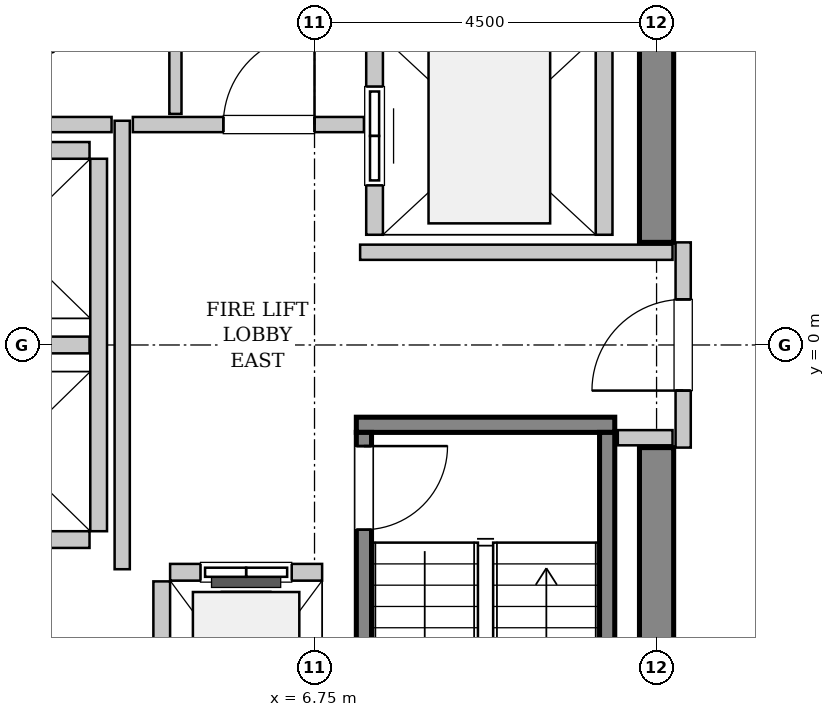
"""IFC4 building model, lengths in metres.
Left out: names, types, materials, properties, quantities, classifications, styles, units other than length and angle.
Written with IfcOpenShell. Run it as: python <this file> out.ifc"""

import sys

from ifc_helpers import new_model, si_unit, direction, frame, frame_2d, origin, place, context, subcontext, project, spatial, rectangle, extrude, source, transform, mapped, element, fill, save


model = new_model("IFC4")
c1 = context("Model", 3, precision=1e-05, world=origin(), true_north=direction((0.0, 1.0)))
c2 = subcontext(c1, "Body", "Model", "MODEL_VIEW")
j1 = project(units=[si_unit("LENGTHUNIT", "METRE"), si_unit("PLANEANGLEUNIT", "RADIAN")], contexts=[c1])
p1 = place(None, origin())
s1 = spatial("IfcSite", under=j1, at=p1, CompositionType="ELEMENT")
p2 = place(p1, origin())
s2 = spatial("IfcBuilding", under=s1, at=p2, CompositionType="ELEMENT")
p3 = place(p2, frame((0.0, 0.0, 218.0)))
s3 = spatial("IfcBuildingStorey", under=s2, at=p3, CompositionType="ELEMENT", Elevation=218.0)
m1 = source(origin(), c2, "Body", "SweptSolid", [
    extrude(rectangle(XDim=7.425, YDim=0.45, at=frame_2d((3.712, 0.0))), origin(), (0.0, 0.0, 1.0), 3.8),
])
for number, where, z_axis, x_axis in (
    (1, (11.25, -8.775, 0.0), (0.0, 0.0, 1.0), (0.0, 1.0, 0.0)),
    (2, (11.25, 1.35, 0.0), (0.0, 0.0, 1.0), (0.0, 1.0, 0.0)),
):
    element("IfcWall", number, at=place(p3, frame(where, z_axis=z_axis, x_axis=x_axis)), inside=s3, PredefinedType="SHEAR", context=c2, shape_type="MappedRepresentation", body=[
        mapped(m1, transform((0.0, 0.0, 0.0), x_axis=(1.0, 0.0, 0.0), y_axis=(0.0, 1.0, 0.0), z_axis=(0.0, 0.0, 1.0), scale=1.0)),
    ])
m2 = source(origin(), c2, "Body", "SweptSolid", [
    extrude(rectangle(XDim=3.4, YDim=0.2, at=frame_2d((1.7, 0.0))), origin(), (0.0, 0.0, 1.0), 3.8),
])
p4 = place(p3, frame((7.3, -1.05, 0.0), z_axis=(0.0, 0.0, 1.0), x_axis=(1.0, 0.0, 0.0)))
e3 = element("IfcWall", 3, at=p4, inside=s3, PredefinedType="SOLIDWALL", context=c2, shape_type="MappedRepresentation", body=[
    mapped(m2, transform((0.0, 0.0, 0.0), x_axis=(1.0, 0.0, 0.0), y_axis=(0.0, 1.0, 0.0), z_axis=(0.0, 0.0, 1.0), scale=1.0)),
])
m3 = source(origin(), c2, "Body", "SweptSolid", [
    extrude(rectangle(XDim=7.1, YDim=0.2, at=frame_2d((3.55, 0.0))), origin(), (0.0, 0.0, 1.0), 3.8),
])
p5 = place(p3, frame((7.4, -1.15, 0.0), z_axis=(0.0, 0.0, 1.0), x_axis=(0.0, -1.0, 0.0)))
e4 = element("IfcWall", 4, at=p5, inside=s3, PredefinedType="SOLIDWALL", context=c2, shape_type="MappedRepresentation", body=[
    mapped(m3, transform((0.0, 0.0, 0.0), x_axis=(1.0, 0.0, 0.0), y_axis=(0.0, 1.0, 0.0), z_axis=(0.0, 0.0, 1.0), scale=1.0)),
])
p6 = place(p5, frame((0.18, 0.0, 0.0)))
e5 = element("IfcOpeningElement", 5, at=p6, cuts=e4, PredefinedType="OPENING", context=c2, shape_type="SweptSolid", body=[
    extrude(rectangle(XDim=1.1, YDim=2.15, at=frame_2d((0.55, 1.075))), frame((0.0, 0.11, 0.0), z_axis=(0.0, -1.0, 0.0), x_axis=(1.0, 0.0, 0.0)), (0.0, 0.0, 1.0), 0.22),
])
p7 = place(p3, frame((10.6, -1.15, 0.0), z_axis=(0.0, 0.0, 1.0), x_axis=(0.0, -1.0, 0.0)))
e6 = element("IfcWall", 6, at=p7, inside=s3, PredefinedType="SOLIDWALL", context=c2, shape_type="MappedRepresentation", body=[
    mapped(m3, transform((0.0, 0.0, 0.0), x_axis=(1.0, 0.0, 0.0), y_axis=(0.0, 1.0, 0.0), z_axis=(0.0, 0.0, 1.0), scale=1.0)),
])
m4 = source(origin(), c2, "Body", "SweptSolid", [
    extrude(rectangle(XDim=2.0, YDim=0.22, at=frame_2d((1.0, 0.0))), origin(), (0.0, 0.0, 1.0), 3.535),
])
p8 = place(p3, frame((6.85, -2.99, 0.0), z_axis=(0.0, 0.0, 1.0), x_axis=(-1.0, 0.0, 0.0)))
e7 = element("IfcWall", 7, at=p8, inside=s3, PredefinedType="SOLIDWALL", context=c2, shape_type="MappedRepresentation", body=[
    mapped(m4, transform((0.0, 0.0, 0.0), x_axis=(1.0, 0.0, 0.0), y_axis=(0.0, 1.0, 0.0), z_axis=(0.0, 0.0, 1.0), scale=1.0)),
])
p9 = place(p8, frame((0.4, 0.0, 0.0)))
e8 = element("IfcOpeningElement", 8, at=p9, cuts=e7, PredefinedType="OPENING", context=c2, shape_type="SweptSolid", body=[
    extrude(rectangle(XDim=1.2, YDim=2.2, at=frame_2d((0.6, 1.1))), frame((0.0, 0.12, 0.0), z_axis=(0.0, -1.0, 0.0), x_axis=(1.0, 0.0, 0.0)), (0.0, 0.0, 1.0), 0.24),
])
m5 = source(origin(), c2, "Body", "SweptSolid", [
    extrude(rectangle(XDim=2.68, YDim=0.22, at=frame_2d((1.34, 0.0))), origin(), (0.0, 0.0, 1.0), 3.535),
])
p10 = place(p3, frame((4.74, -3.11, 0.0), z_axis=(0.0, 0.0, 1.0), x_axis=(0.0, -1.0, 0.0)))
e9 = element("IfcWall", 9, at=p10, inside=s3, PredefinedType="SOLIDWALL", context=c2, shape_type="MappedRepresentation", body=[
    mapped(m5, transform((0.0, 0.0, 0.0), x_axis=(1.0, 0.0, 0.0), y_axis=(0.0, 1.0, 0.0), z_axis=(0.0, 0.0, 1.0), scale=1.0)),
])
m6 = source(origin(), c2, "Body", "SweptSolid", [
    extrude(rectangle(XDim=5.45, YDim=0.22, at=frame_2d((2.725, 0.0))), origin(), (0.0, 0.0, 1.0), 3.535),
])
p11 = place(p3, frame((7.54, 6.9, 0.0), z_axis=(0.0, 0.0, 1.0), x_axis=(0.0, -1.0, 0.0)))
e10 = element("IfcWall", 10, at=p11, inside=s3, PredefinedType="SOLIDWALL", context=c2, shape_type="MappedRepresentation", body=[
    mapped(m6, transform((0.0, 0.0, 0.0), x_axis=(1.0, 0.0, 0.0), y_axis=(0.0, 1.0, 0.0), z_axis=(0.0, 0.0, 1.0), scale=1.0)),
])
p12 = place(p11, frame((3.5, 0.0, 0.0)))
e11 = element("IfcOpeningElement", 11, at=p12, cuts=e10, PredefinedType="OPENING", context=c2, shape_type="SweptSolid", body=[
    extrude(rectangle(XDim=1.3, YDim=2.3, at=frame_2d((0.65, 1.15))), frame((0.0, 0.12, 0.0), z_axis=(0.0, -1.0, 0.0), x_axis=(1.0, 0.0, 0.0)), (0.0, 0.0, 1.0), 0.24),
])
p13 = place(p11, frame((0.65, 0.0, 0.0)))
e12 = element("IfcOpeningElement", 12, at=p13, cuts=e10, PredefinedType="OPENING", context=c2, shape_type="SweptSolid", body=[
    extrude(rectangle(XDim=1.3, YDim=2.3, at=frame_2d((0.65, 1.15))), frame((0.0, 0.12, 0.0), z_axis=(0.0, -1.0, 0.0), x_axis=(1.0, 0.0, 0.0)), (0.0, 0.0, 1.0), 0.24),
])
p14 = place(p3, frame((10.56, 1.45, 0.0), z_axis=(0.0, 0.0, 1.0), x_axis=(0.0, 1.0, 0.0)))
e13 = element("IfcWall", 13, at=p14, inside=s3, PredefinedType="SOLIDWALL", context=c2, shape_type="MappedRepresentation", body=[
    mapped(m6, transform((0.0, 0.0, 0.0), x_axis=(1.0, 0.0, 0.0), y_axis=(0.0, 1.0, 0.0), z_axis=(0.0, 0.0, 1.0), scale=1.0)),
])
m7 = source(origin(), c2, "Body", "SweptSolid", [
    extrude(rectangle(XDim=4.9, YDim=0.22, at=frame_2d((2.45, 0.0))), origin(), (0.0, 0.0, 1.0), 3.535),
])
p15 = place(p3, frame((3.91, -2.45, 0.0), z_axis=(0.0, 0.0, 1.0), x_axis=(0.0, 1.0, 0.0)))
e14 = element("IfcWall", 14, at=p15, inside=s3, PredefinedType="SOLIDWALL", context=c2, shape_type="MappedRepresentation", body=[
    mapped(m7, transform((0.0, 0.0, 0.0), x_axis=(1.0, 0.0, 0.0), y_axis=(0.0, 1.0, 0.0), z_axis=(0.0, 0.0, 1.0), scale=1.0)),
])
m8 = source(origin(), c2, "Body", "SweptSolid", [
    extrude(rectangle(XDim=2.13, YDim=0.22, at=frame_2d((1.065, 0.0))), origin(), (0.0, 0.0, 1.0), 3.535),
])
for number, where, z_axis, x_axis in (
    (15, (1.66, -2.56, 0.0), (0.0, 0.0, 1.0), (1.0, 0.0, 0.0)),
    (16, (1.66, 0.0, 0.0), (0.0, 0.0, 1.0), (1.0, 0.0, 0.0)),
    (17, (3.79, 2.56, 0.0), (0.0, 0.0, 1.0), (-1.0, 0.0, 0.0)),
):
    element("IfcWall", number, at=place(p3, frame(where, z_axis=z_axis, x_axis=x_axis)), inside=s3, PredefinedType="SOLIDWALL", context=c2, shape_type="MappedRepresentation", body=[
        mapped(m8, transform((0.0, 0.0, 0.0), x_axis=(1.0, 0.0, 0.0), y_axis=(0.0, 1.0, 0.0), z_axis=(0.0, 0.0, 1.0), scale=1.0)),
    ])
m9 = source(origin(), c2, "Body", "SweptSolid", [
    extrude(rectangle(XDim=2.7, YDim=0.2, at=frame_2d((1.35, 0.0))), origin(), (0.0, 0.0, 1.0), 2.625),
])
p16 = place(p3, frame((11.6, -1.35, 0.0), z_axis=(0.0, 0.0, 1.0), x_axis=(0.0, 1.0, 0.0)))
e18 = element("IfcWall", 18, at=p16, inside=s3, PredefinedType="PARTITIONING", context=c2, shape_type="MappedRepresentation", body=[
    mapped(m9, transform((0.0, 0.0, 0.0), x_axis=(1.0, 0.0, 0.0), y_axis=(0.0, 1.0, 0.0), z_axis=(0.0, 0.0, 1.0), scale=1.0)),
])
p17 = place(p16, frame((0.75, 0.0, 0.0)))
e19 = element("IfcOpeningElement", 19, at=p17, cuts=e18, PredefinedType="OPENING", context=c2, shape_type="SweptSolid", body=[
    extrude(rectangle(XDim=1.2, YDim=2.15, at=frame_2d((0.6, 1.075))), frame((0.0, 0.11, 0.0), z_axis=(0.0, -1.0, 0.0), x_axis=(1.0, 0.0, 0.0)), (0.0, 0.0, 1.0), 0.22),
])
m10 = source(origin(), c2, "Body", "SweptSolid", [
    extrude(rectangle(XDim=5.9, YDim=0.2, at=frame_2d((2.95, 0.0))), origin(), (0.0, 0.0, 1.0), 3.535),
])
p18 = place(p3, frame((4.22, -2.95, 0.0), z_axis=(0.0, 0.0, 1.0), x_axis=(0.0, 1.0, 0.0)))
e20 = element("IfcWall", 20, at=p18, inside=s3, PredefinedType="PARTITIONING", context=c2, shape_type="MappedRepresentation", body=[
    mapped(m10, transform((0.0, 0.0, 0.0), x_axis=(1.0, 0.0, 0.0), y_axis=(0.0, 1.0, 0.0), z_axis=(0.0, 0.0, 1.0), scale=1.0)),
])
m11 = source(origin(), c2, "Body", "SweptSolid", [
    extrude(rectangle(XDim=2.52, YDim=0.2, at=frame_2d((1.26, 0.0))), origin(), (0.0, 0.0, 1.0), 3.535),
])
p19 = place(p3, frame((1.56, 2.9, 0.0), z_axis=(0.0, 0.0, 1.0), x_axis=(1.0, 0.0, 0.0)))
e21 = element("IfcWall", 21, at=p19, inside=s3, PredefinedType="PARTITIONING", context=c2, shape_type="MappedRepresentation", body=[
    mapped(m11, transform((0.0, 0.0, 0.0), x_axis=(1.0, 0.0, 0.0), y_axis=(0.0, 1.0, 0.0), z_axis=(0.0, 0.0, 1.0), scale=1.0)),
])
m12 = source(origin(), c2, "Body", "SweptSolid", [
    extrude(rectangle(XDim=3.04, YDim=0.2, at=frame_2d((1.52, 0.0))), origin(), (0.0, 0.0, 1.0), 3.535),
])
p20 = place(p3, frame((4.36, 2.9, 0.0), z_axis=(0.0, 0.0, 1.0), x_axis=(1.0, 0.0, 0.0)))
e22 = element("IfcWall", 22, at=p20, inside=s3, PredefinedType="PARTITIONING", context=c2, shape_type="MappedRepresentation", body=[
    mapped(m12, transform((0.0, 0.0, 0.0), x_axis=(1.0, 0.0, 0.0), y_axis=(0.0, 1.0, 0.0), z_axis=(0.0, 0.0, 1.0), scale=1.0)),
])
p21 = place(p20, frame((1.19, 0.0, 0.0)))
e23 = element("IfcOpeningElement", 23, at=p21, cuts=e22, PredefinedType="OPENING", context=c2, shape_type="SweptSolid", body=[
    extrude(rectangle(XDim=1.2, YDim=2.15, at=frame_2d((0.6, 1.075))), frame((0.0, 0.11, 0.0), z_axis=(0.0, -1.0, 0.0), x_axis=(1.0, 0.0, 0.0)), (0.0, 0.0, 1.0), 0.22),
])
m13 = source(origin(), c2, "Body", "SweptSolid", [
    extrude(rectangle(XDim=4.11, YDim=0.2, at=frame_2d((2.055, 0.0))), origin(), (0.0, 0.0, 1.0), 3.535),
])
p22 = place(p3, frame((7.35, 1.22, 0.0), z_axis=(0.0, 0.0, 1.0), x_axis=(1.0, 0.0, 0.0)))
e24 = element("IfcWall", 24, at=p22, inside=s3, PredefinedType="PARTITIONING", context=c2, shape_type="MappedRepresentation", body=[
    mapped(m13, transform((0.0, 0.0, 0.0), x_axis=(1.0, 0.0, 0.0), y_axis=(0.0, 1.0, 0.0), z_axis=(0.0, 0.0, 1.0), scale=1.0)),
])
m14 = source(origin(), c2, "Body", "SweptSolid", [
    extrude(rectangle(XDim=0.72, YDim=0.2, at=frame_2d((0.36, 0.0))), origin(), (0.0, 0.0, 1.0), 3.535),
])
p23 = place(p3, frame((10.74, -1.22, 0.0), z_axis=(0.0, 0.0, 1.0), x_axis=(1.0, 0.0, 0.0)))
e25 = element("IfcWall", 25, at=p23, inside=s3, PredefinedType="PARTITIONING", context=c2, shape_type="MappedRepresentation", body=[
    mapped(m14, transform((0.0, 0.0, 0.0), x_axis=(1.0, 0.0, 0.0), y_axis=(0.0, 1.0, 0.0), z_axis=(0.0, 0.0, 1.0), scale=1.0)),
])
m15 = source(origin(), c2, "Body", "SweptSolid", [
    extrude(rectangle(XDim=5.45, YDim=0.16, at=frame_2d((2.725, 0.0))), origin(), (0.0, 0.0, 1.0), 3.535),
])
p24 = place(p3, frame((4.92, 3.04, 0.0), z_axis=(0.0, 0.0, 1.0), x_axis=(0.0, 1.0, 0.0)))
e26 = element("IfcWall", 26, at=p24, inside=s3, PredefinedType="PARTITIONING", context=c2, shape_type="MappedRepresentation", body=[
    mapped(m15, transform((0.0, 0.0, 0.0), x_axis=(1.0, 0.0, 0.0), y_axis=(0.0, 1.0, 0.0), z_axis=(0.0, 0.0, 1.0), scale=1.0)),
])
m16 = source(origin(), c2, "Body", "SweptSolid", [
    extrude(rectangle(XDim=1.1, YDim=2.15, at=frame_2d((0.55, 1.075))), frame((0.0, 0.025, 0.0), z_axis=(0.0, -1.0, 0.0), x_axis=(1.0, 0.0, 0.0)), (0.0, 0.0, 1.0), 0.05),
])
p25 = place(p6, origin())
e27 = element("IfcDoor", 27, at=p25, inside=s3, OperationType="SINGLE_SWING_LEFT", PredefinedType="DOOR", context=c2, shape_type="MappedRepresentation", body=[
    mapped(m16, transform((0.0, 0.0, 0.0), x_axis=(1.0, 0.0, 0.0), y_axis=(0.0, 1.0, 0.0), z_axis=(0.0, 0.0, 1.0), scale=1.0)),
])
fill(e5, e27)
m17 = source(origin(), c2, "Body", "SweptSolid", [
    extrude(rectangle(XDim=1.2, YDim=2.2, at=frame_2d((0.6, 1.1))), frame((0.0, 0.025, 0.0), z_axis=(0.0, -1.0, 0.0), x_axis=(1.0, 0.0, 0.0)), (0.0, 0.0, 1.0), 0.05),
])
p26 = place(p9, origin())
e28 = element("IfcDoor", 28, at=p26, inside=s3, OperationType="SLIDING_TO_LEFT", PredefinedType="DOOR", context=c2, shape_type="MappedRepresentation", body=[
    mapped(m17, transform((0.0, 0.0, 0.0), x_axis=(1.0, 0.0, 0.0), y_axis=(0.0, 1.0, 0.0), z_axis=(0.0, 0.0, 1.0), scale=1.0)),
])
fill(e8, e28)
m18 = source(origin(), c2, "Body", "SweptSolid", [
    extrude(rectangle(XDim=1.3, YDim=2.3, at=frame_2d((0.65, 1.15))), frame((0.0, 0.025, 0.0), z_axis=(0.0, -1.0, 0.0), x_axis=(1.0, 0.0, 0.0)), (0.0, 0.0, 1.0), 0.05),
])
p27 = place(p12, origin())
e29 = element("IfcDoor", 29, at=p27, inside=s3, OperationType="SLIDING_TO_RIGHT", PredefinedType="DOOR", context=c2, shape_type="MappedRepresentation", body=[
    mapped(m18, transform((0.0, 0.0, 0.0), x_axis=(1.0, 0.0, 0.0), y_axis=(0.0, 1.0, 0.0), z_axis=(0.0, 0.0, 1.0), scale=1.0)),
])
fill(e11, e29)
m19 = source(origin(), c2, "Body", "SweptSolid", [
    extrude(rectangle(XDim=1.2, YDim=2.15, at=frame_2d((0.6, 1.075))), frame((0.0, 0.025, 0.0), z_axis=(0.0, -1.0, 0.0), x_axis=(1.0, 0.0, 0.0)), (0.0, 0.0, 1.0), 0.05),
])
p28 = place(p17, origin())
e30 = element("IfcDoor", 30, at=p28, inside=s3, OperationType="SINGLE_SWING_LEFT", PredefinedType="DOOR", context=c2, shape_type="MappedRepresentation", body=[
    mapped(m19, transform((0.0, 0.0, 0.0), x_axis=(1.0, 0.0, 0.0), y_axis=(0.0, 1.0, 0.0), z_axis=(0.0, 0.0, 1.0), scale=1.0)),
])
fill(e19, e30)
p29 = place(p21, origin())
e31 = element("IfcDoor", 31, at=p29, inside=s3, OperationType="SINGLE_SWING_RIGHT", PredefinedType="DOOR", context=c2, shape_type="MappedRepresentation", body=[
    mapped(m19, transform((0.0, 0.0, 0.0), x_axis=(1.0, 0.0, 0.0), y_axis=(0.0, 1.0, 0.0), z_axis=(0.0, 0.0, 1.0), scale=1.0)),
])
fill(e23, e31)
save(model, sys.argv[1])
